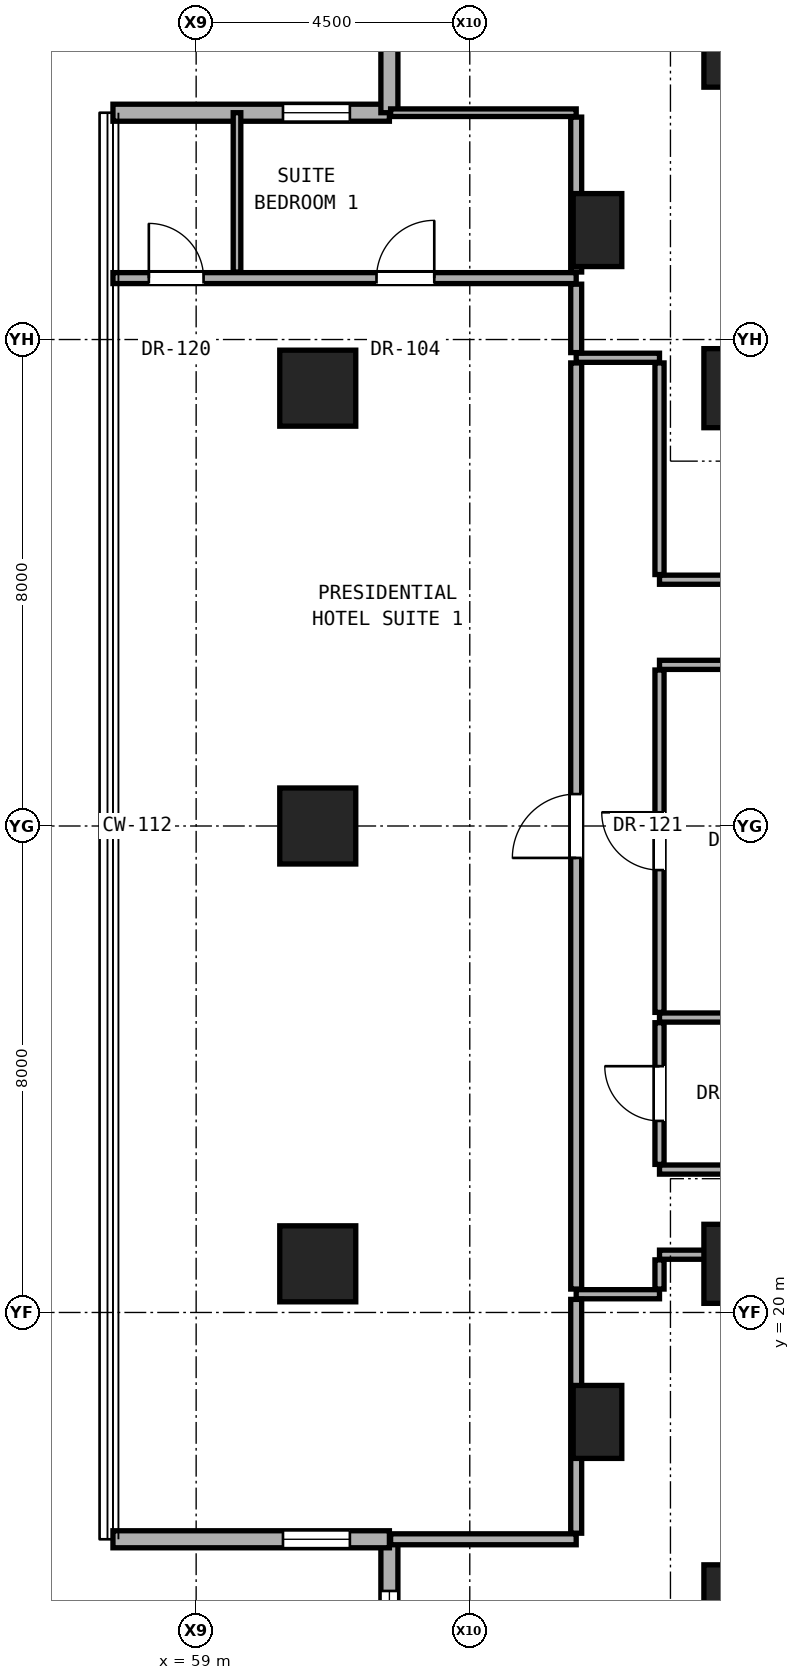
"""IFC4 building model, lengths in metres.
Left out: names, types, materials, properties, quantities, classifications, styles, units other than length and angle.
Written with IfcOpenShell. Run it as: python <this file> out.ifc"""

import sys

from ifc_helpers import new_model, si_unit, direction, frame, frame_2d, origin, origin_2d, place, context, subcontext, project, spatial, rectangle, hollow_rectangle, extrude, element, fill, save


model = new_model("IFC4")
c1 = context("Model", 3, precision=1e-05, world=origin(), true_north=direction((0.0, 1.0)))
c2 = subcontext(c1, "Body", "Model", "MODEL_VIEW")
j1 = project(units=[si_unit("LENGTHUNIT", "METRE"), si_unit("PLANEANGLEUNIT", "RADIAN")], contexts=[c1])
p1 = place(None, origin())
s1 = spatial("IfcSite", under=j1, at=p1, CompositionType="ELEMENT")
p2 = place(p1, origin())
s2 = spatial("IfcBuilding", under=s1, at=p2, CompositionType="ELEMENT")
p3 = place(p2, frame((0.0, 0.0, 71.9)))
s3 = spatial("IfcBuildingStorey", under=s2, at=p3, CompositionType="ELEMENT", Elevation=71.9)
for number, where, z_axis, x_axis in (
    (1, (68.0, 15.2, 0.0), (0.0, 0.0, 1.0), (1.0, 0.0, 0.0)),
    (2, (68.0, 20.8, 0.0), (0.0, 0.0, 1.0), (1.0, 0.0, 0.0)),
    (3, (68.0, 35.2, 0.0), (0.0, 0.0, 1.0), (1.0, 0.0, 0.0)),
    (4, (68.0, 40.8, 0.0), (0.0, 0.0, 1.0), (1.0, 0.0, 0.0)),
):
    element("IfcColumn", number, at=place(p3, frame(where, z_axis=z_axis, x_axis=x_axis)), inside=s3, PredefinedType="COLUMN", context=c2, shape_type="SweptSolid", body=[
        extrude(rectangle(XDim=1.3, YDim=1.3, at=origin_2d()), origin(), (0.0, 0.0, 1.0), 3.3),
    ])
for number, where, z_axis, x_axis in (
    (5, (61.0, 20.8, 0.0), (0.0, 0.0, 1.0), (1.0, 0.0, 0.0)),
    (6, (61.0, 28.0, 0.0), (0.0, 0.0, 1.0), (1.0, 0.0, 0.0)),
    (7, (61.0, 35.2, 0.0), (0.0, 0.0, 1.0), (1.0, 0.0, 0.0)),
):
    element("IfcColumn", number, at=place(p3, frame(where, z_axis=z_axis, x_axis=x_axis)), inside=s3, PredefinedType="COLUMN", context=c2, shape_type="SweptSolid", body=[
        extrude(hollow_rectangle(XDim=1.25, YDim=1.25, WallThickness=0.07, at=origin_2d()), origin(), (0.0, 0.0, 1.0), 3.3),
    ])
for number, where, z_axis, x_axis in (
    (8, (65.6, 18.2, 0.0), (0.0, 0.0, 1.0), (1.0, 0.0, 0.0)),
    (9, (65.6, 37.8, 0.0), (0.0, 0.0, 1.0), (1.0, 0.0, 0.0)),
):
    element("IfcColumn", number, at=place(p3, frame(where, z_axis=z_axis, x_axis=x_axis)), inside=s3, PredefinedType="PILASTER", context=c2, shape_type="SweptSolid", body=[
        extrude(rectangle(XDim=0.8, YDim=1.2, at=origin_2d()), origin(), (0.0, 0.0, 1.0), 3.3),
    ])
p4 = place(p3, frame((62.178, 16.27, 0.0), z_axis=(0.0, 0.0, 1.0), x_axis=(0.0, -1.0, 0.0)))
e10 = element("IfcWall", 10, at=p4, inside=s3, PredefinedType="SOLIDWALL", context=c2, shape_type="SweptSolid", body=[
    extrude(rectangle(XDim=4.546, YDim=0.28, at=frame_2d((2.273, 0.0))), origin(), (0.0, 0.0, 1.0), 3.04),
])
p5 = place(p4, frame((0.85, 0.0, 0.79)))
e11 = element("IfcOpeningElement", 11, at=p5, cuts=e10, PredefinedType="OPENING", context=c2, shape_type="SweptSolid", body=[
    extrude(rectangle(XDim=1.2, YDim=2.1, at=frame_2d((0.6, 1.05))), frame((0.0, 0.15, 0.0), z_axis=(0.0, -1.0, 0.0), x_axis=(1.0, 0.0, 0.0)), (0.0, 0.0, 1.0), 0.3),
])
p6 = place(p3, frame((57.632, 16.27, 0.0), z_axis=(0.0, 0.0, 1.0), x_axis=(1.0, 0.0, 0.0)))
e12 = element("IfcWall", 12, at=p6, inside=s3, PredefinedType="SOLIDWALL", context=c2, shape_type="SweptSolid", body=[
    extrude(rectangle(XDim=4.546, YDim=0.28, at=frame_2d((2.273, 0.0))), origin(), (0.0, 0.0, 1.0), 3.04),
])
p7 = place(p6, frame((2.796, 0.0, 0.85)))
e13 = element("IfcOpeningElement", 13, at=p7, cuts=e12, PredefinedType="OPENING", context=c2, shape_type="SweptSolid", body=[
    extrude(rectangle(XDim=1.1, YDim=2.0, at=frame_2d((0.55, 1.0))), frame((0.0, 0.15, 0.0), z_axis=(0.0, -1.0, 0.0), x_axis=(1.0, 0.0, 0.0)), (0.0, 0.0, 1.0), 0.3),
])
p8 = place(p3, frame((62.178, 39.73, 0.0), z_axis=(0.0, 0.0, 1.0), x_axis=(-1.0, 0.0, 0.0)))
e14 = element("IfcWall", 14, at=p8, inside=s3, PredefinedType="SOLIDWALL", context=c2, shape_type="SweptSolid", body=[
    extrude(rectangle(XDim=4.546, YDim=0.28, at=frame_2d((2.273, 0.0))), origin(), (0.0, 0.0, 1.0), 3.04),
])
p9 = place(p8, frame((0.65, 0.0, 0.85)))
e15 = element("IfcOpeningElement", 15, at=p9, cuts=e14, PredefinedType="OPENING", context=c2, shape_type="SweptSolid", body=[
    extrude(rectangle(XDim=1.1, YDim=2.0, at=frame_2d((0.55, 1.0))), frame((0.0, 0.15, 0.0), z_axis=(0.0, -1.0, 0.0), x_axis=(1.0, 0.0, 0.0)), (0.0, 0.0, 1.0), 0.3),
])
p10 = place(p3, frame((62.178, 44.276, 0.0), z_axis=(0.0, 0.0, 1.0), x_axis=(0.0, -1.0, 0.0)))
e16 = element("IfcWall", 16, at=p10, inside=s3, PredefinedType="SOLIDWALL", context=c2, shape_type="SweptSolid", body=[
    extrude(rectangle(XDim=4.546, YDim=0.28, at=frame_2d((2.273, 0.0))), origin(), (0.0, 0.0, 1.0), 3.04),
])
p11 = place(p3, frame((62.198, 16.27, 0.0), z_axis=(0.0, 0.0, 1.0), x_axis=(1.0, 0.0, 0.0)))
e17 = element("IfcWall", 17, at=p11, inside=s3, PredefinedType="PARTITIONING", context=c2, shape_type="SweptSolid", body=[
    extrude(rectangle(XDim=3.052, YDim=0.18, at=frame_2d((1.526, 0.0))), origin(), (0.0, 0.0, 1.0), 3.06),
])
p12 = place(p3, frame((65.25, 20.3, 0.0), z_axis=(0.0, 0.0, 1.0), x_axis=(1.0, 0.0, 0.0)))
e18 = element("IfcWall", 18, at=p12, inside=s3, PredefinedType="PARTITIONING", context=c2, shape_type="SweptSolid", body=[
    extrude(rectangle(XDim=1.37, YDim=0.15, at=frame_2d((0.685, 0.0))), origin(), (0.0, 0.0, 1.0), 3.06),
])
p13 = place(p3, frame((66.62, 20.95, 0.0), z_axis=(0.0, 0.0, 1.0), x_axis=(1.0, 0.0, 0.0)))
e19 = element("IfcWall", 19, at=p13, inside=s3, PredefinedType="PARTITIONING", context=c2, shape_type="SweptSolid", body=[
    extrude(rectangle(XDim=1.06, YDim=0.15, at=frame_2d((0.53, 0.0))), origin(), (0.0, 0.0, 1.0), 2.452),
])
p14 = place(p3, frame((66.62, 22.35, 0.0), z_axis=(0.0, 0.0, 1.0), x_axis=(1.0, 0.0, 0.0)))
e20 = element("IfcWall", 20, at=p14, inside=s3, PredefinedType="PARTITIONING", context=c2, shape_type="SweptSolid", body=[
    extrude(rectangle(XDim=19.63, YDim=0.15, at=frame_2d((9.815, 0.0))), origin(), (0.0, 0.0, 1.0), 2.125),
])
p15 = place(p14, frame((8.981, 0.0, 0.0)))
e21 = element("IfcOpeningElement", 21, at=p15, cuts=e20, PredefinedType="OPENING", context=c2, shape_type="SweptSolid", body=[
    extrude(rectangle(XDim=0.85, YDim=2.01, at=frame_2d((0.425, 1.005))), frame((0.0, 0.085, 0.0), z_axis=(0.0, -1.0, 0.0), x_axis=(1.0, 0.0, 0.0)), (0.0, 0.0, 1.0), 0.17),
])
p16 = place(p14, frame((16.061, 0.0, 0.0)))
e22 = element("IfcOpeningElement", 22, at=p16, cuts=e20, PredefinedType="OPENING", context=c2, shape_type="SweptSolid", body=[
    extrude(rectangle(XDim=0.85, YDim=2.01, at=frame_2d((0.425, 1.005))), frame((0.0, 0.085, 0.0), z_axis=(0.0, -1.0, 0.0), x_axis=(1.0, 0.0, 0.0)), (0.0, 0.0, 1.0), 0.17),
])
p17 = place(p3, frame((66.62, 24.85, 0.0), z_axis=(0.0, 0.0, 1.0), x_axis=(1.0, 0.0, 0.0)))
e23 = element("IfcWall", 23, at=p17, inside=s3, PredefinedType="PARTITIONING", context=c2, shape_type="SweptSolid", body=[
    extrude(rectangle(XDim=3.13, YDim=0.15, at=frame_2d((1.565, 0.0))), origin(), (0.0, 0.0, 1.0), 2.125),
])
p18 = place(p3, frame((66.62, 30.65, 0.0), z_axis=(0.0, 0.0, 1.0), x_axis=(1.0, 0.0, 0.0)))
e24 = element("IfcWall", 24, at=p18, inside=s3, PredefinedType="PARTITIONING", context=c2, shape_type="SweptSolid", body=[
    extrude(rectangle(XDim=19.63, YDim=0.15, at=frame_2d((9.815, 0.0))), origin(), (0.0, 0.0, 1.0), 2.125),
])
p19 = place(p18, frame((3.855, 0.0, 0.0)))
e25 = element("IfcOpeningElement", 25, at=p19, cuts=e24, PredefinedType="OPENING", context=c2, shape_type="SweptSolid", body=[
    extrude(rectangle(XDim=0.85, YDim=2.01, at=frame_2d((0.425, 1.005))), frame((0.0, 0.085, 0.0), z_axis=(0.0, -1.0, 0.0), x_axis=(1.0, 0.0, 0.0)), (0.0, 0.0, 1.0), 0.17),
])
p20 = place(p18, frame((8.981, 0.0, 0.0)))
e26 = element("IfcOpeningElement", 26, at=p20, cuts=e24, PredefinedType="OPENING", context=c2, shape_type="SweptSolid", body=[
    extrude(rectangle(XDim=0.85, YDim=2.01, at=frame_2d((0.425, 1.005))), frame((0.0, 0.085, 0.0), z_axis=(0.0, -1.0, 0.0), x_axis=(1.0, 0.0, 0.0)), (0.0, 0.0, 1.0), 0.17),
])
p21 = place(p18, frame((16.061, 0.0, 0.0)))
e27 = element("IfcOpeningElement", 27, at=p21, cuts=e24, PredefinedType="OPENING", context=c2, shape_type="SweptSolid", body=[
    extrude(rectangle(XDim=0.85, YDim=2.01, at=frame_2d((0.425, 1.005))), frame((0.0, 0.085, 0.0), z_axis=(0.0, -1.0, 0.0), x_axis=(1.0, 0.0, 0.0)), (0.0, 0.0, 1.0), 0.17),
])
p22 = place(p3, frame((66.62, 32.05, 0.0), z_axis=(0.0, 0.0, 1.0), x_axis=(1.0, 0.0, 0.0)))
e28 = element("IfcWall", 28, at=p22, inside=s3, PredefinedType="PARTITIONING", context=c2, shape_type="SweptSolid", body=[
    extrude(rectangle(XDim=2.18, YDim=0.15, at=frame_2d((1.09, 0.0))), origin(), (0.0, 0.0, 1.0), 2.125),
])
p23 = place(p3, frame((65.25, 35.7, 0.0), z_axis=(0.0, 0.0, 1.0), x_axis=(1.0, 0.0, 0.0)))
e29 = element("IfcWall", 29, at=p23, inside=s3, PredefinedType="PARTITIONING", context=c2, shape_type="SweptSolid", body=[
    extrude(rectangle(XDim=1.37, YDim=0.15, at=frame_2d((0.685, 0.0))), origin(), (0.0, 0.0, 1.0), 3.06),
])
p24 = place(p3, frame((57.632, 37.01, 0.0), z_axis=(0.0, 0.0, 1.0), x_axis=(1.0, 0.0, 0.0)))
e30 = element("IfcWall", 30, at=p24, inside=s3, PredefinedType="PARTITIONING", context=c2, shape_type="SweptSolid", body=[
    extrude(rectangle(XDim=7.618, YDim=0.18, at=frame_2d((3.809, 0.0))), origin(), (0.0, 0.0, 1.0), 2.436),
])
p25 = place(p24, frame((4.334, 0.0, 0.0)))
e31 = element("IfcOpeningElement", 31, at=p25, cuts=e30, PredefinedType="OPENING", context=c2, shape_type="SweptSolid", body=[
    extrude(rectangle(XDim=0.95, YDim=2.15, at=frame_2d((0.475, 1.075))), frame((0.0, 0.1, 0.0), z_axis=(0.0, -1.0, 0.0), x_axis=(1.0, 0.0, 0.0)), (0.0, 0.0, 1.0), 0.2),
])
p26 = place(p24, frame((0.59, 0.0, 0.0)))
e32 = element("IfcOpeningElement", 32, at=p26, cuts=e30, PredefinedType="OPENING", context=c2, shape_type="SweptSolid", body=[
    extrude(rectangle(XDim=0.9, YDim=2.1, at=frame_2d((0.45, 1.05))), frame((0.0, 0.1, 0.0), z_axis=(0.0, -1.0, 0.0), x_axis=(1.0, 0.0, 0.0)), (0.0, 0.0, 1.0), 0.2),
])
p27 = place(p3, frame((62.198, 39.73, 0.0), z_axis=(0.0, 0.0, 1.0), x_axis=(1.0, 0.0, 0.0)))
e33 = element("IfcWall", 33, at=p27, inside=s3, PredefinedType="PARTITIONING", context=c2, shape_type="SweptSolid", body=[
    extrude(rectangle(XDim=3.052, YDim=0.125, at=frame_2d((1.526, 0.0))), origin(), (0.0, 0.0, 1.0), 3.06),
])
p28 = place(p3, frame((59.672, 37.11, 0.0), z_axis=(0.0, 0.0, 1.0), x_axis=(0.0, 1.0, 0.0)))
e34 = element("IfcWall", 34, at=p28, inside=s3, PredefinedType="PARTITIONING", context=c2, shape_type="SweptSolid", body=[
    extrude(rectangle(XDim=2.62, YDim=0.125, at=frame_2d((1.31, 0.0))), origin(), (0.0, 0.0, 1.0), 3.06),
])
p29 = place(p3, frame((65.25, 16.37, 0.0), z_axis=(0.0, 0.0, 1.0), x_axis=(0.0, 1.0, 0.0)))
e35 = element("IfcWall", 35, at=p29, inside=s3, PredefinedType="PARTITIONING", context=c2, shape_type="SweptSolid", body=[
    extrude(rectangle(XDim=3.845, YDim=0.18, at=frame_2d((1.922, 0.0))), origin(), (0.0, 0.0, 1.0), 2.436),
])
p30 = place(p3, frame((65.25, 20.385, 0.0), z_axis=(0.0, 0.0, 1.0), x_axis=(0.0, 1.0, 0.0)))
e36 = element("IfcWall", 36, at=p30, inside=s3, PredefinedType="PARTITIONING", context=c2, shape_type="SweptSolid", body=[
    extrude(rectangle(XDim=15.23, YDim=0.18, at=frame_2d((7.615, 0.0))), origin(), (0.0, 0.0, 1.0), 2.279),
])
p31 = place(p30, frame((7.09, 0.0, 0.0)))
e37 = element("IfcOpeningElement", 37, at=p31, cuts=e36, PredefinedType="OPENING", context=c2, shape_type="SweptSolid", body=[
    extrude(rectangle(XDim=1.05, YDim=2.2, at=frame_2d((0.525, 1.1))), frame((0.0, 0.1, 0.0), z_axis=(0.0, -1.0, 0.0), x_axis=(1.0, 0.0, 0.0)), (0.0, 0.0, 1.0), 0.2),
])
p32 = place(p3, frame((65.25, 35.785, 0.0), z_axis=(0.0, 0.0, 1.0), x_axis=(0.0, 1.0, 0.0)))
e38 = element("IfcWall", 38, at=p32, inside=s3, PredefinedType="PARTITIONING", context=c2, shape_type="SweptSolid", body=[
    extrude(rectangle(XDim=1.125, YDim=0.18, at=frame_2d((0.562, 0.0))), origin(), (0.0, 0.0, 1.0), 3.06),
])
p33 = place(p3, frame((65.25, 37.11, 0.0), z_axis=(0.0, 0.0, 1.0), x_axis=(0.0, 1.0, 0.0)))
e39 = element("IfcWall", 39, at=p33, inside=s3, PredefinedType="PARTITIONING", context=c2, shape_type="SweptSolid", body=[
    extrude(rectangle(XDim=2.547, YDim=0.18, at=frame_2d((1.274, 0.0))), origin(), (0.0, 0.0, 1.0), 2.436),
])
p34 = place(p3, frame((66.62, 20.385, 0.0), z_axis=(0.0, 0.0, 1.0), x_axis=(0.0, 1.0, 0.0)))
e40 = element("IfcWall", 40, at=p34, inside=s3, PredefinedType="PARTITIONING", context=c2, shape_type="SweptSolid", body=[
    extrude(rectangle(XDim=0.48, YDim=0.15, at=frame_2d((0.24, 0.0))), origin(), (0.0, 0.0, 1.0), 2.452),
])
p35 = place(p3, frame((66.62, 22.435, 0.0), z_axis=(0.0, 0.0, 1.0), x_axis=(0.0, 1.0, 0.0)))
e41 = element("IfcWall", 41, at=p35, inside=s3, PredefinedType="PARTITIONING", context=c2, shape_type="SweptSolid", body=[
    extrude(rectangle(XDim=2.33, YDim=0.15, at=frame_2d((1.165, 0.0))), origin(), (0.0, 0.0, 1.0), 3.06),
])
p36 = place(p35, frame((0.715, 0.0, 0.0)))
e42 = element("IfcOpeningElement", 42, at=p36, cuts=e41, PredefinedType="OPENING", context=c2, shape_type="SweptSolid", body=[
    extrude(rectangle(XDim=0.9, YDim=2.1, at=frame_2d((0.45, 1.05))), frame((0.0, 0.085, 0.0), z_axis=(0.0, -1.0, 0.0), x_axis=(1.0, 0.0, 0.0)), (0.0, 0.0, 1.0), 0.17),
])
p37 = place(p3, frame((66.62, 24.935, 0.0), z_axis=(0.0, 0.0, 1.0), x_axis=(0.0, 1.0, 0.0)))
e43 = element("IfcWall", 43, at=p37, inside=s3, PredefinedType="PARTITIONING", context=c2, shape_type="SweptSolid", body=[
    extrude(rectangle(XDim=5.63, YDim=0.15, at=frame_2d((2.815, 0.0))), origin(), (0.0, 0.0, 1.0), 2.279),
])
p38 = place(p37, frame((2.34, 0.0, 0.0)))
e44 = element("IfcOpeningElement", 44, at=p38, cuts=e43, PredefinedType="OPENING", context=c2, shape_type="SweptSolid", body=[
    extrude(rectangle(XDim=0.95, YDim=2.15, at=frame_2d((0.475, 1.075))), frame((0.0, 0.085, 0.0), z_axis=(0.0, -1.0, 0.0), x_axis=(1.0, 0.0, 0.0)), (0.0, 0.0, 1.0), 0.17),
])
p39 = place(p3, frame((66.62, 32.135, 0.0), z_axis=(0.0, 0.0, 1.0), x_axis=(0.0, 1.0, 0.0)))
e45 = element("IfcWall", 45, at=p39, inside=s3, PredefinedType="PARTITIONING", context=c2, shape_type="SweptSolid", body=[
    extrude(rectangle(XDim=3.48, YDim=0.15, at=frame_2d((1.74, 0.0))), origin(), (0.0, 0.0, 1.0), 2.452),
])
p40 = place(p5, origin())
e46 = element("IfcWindow", 46, at=p40, inside=s3, PartitioningType="SINGLE_PANEL", PredefinedType="WINDOW", context=c2, shape_type="SweptSolid", body=[
    extrude(rectangle(XDim=1.2, YDim=2.1, at=frame_2d((0.6, 1.05))), frame((0.0, 0.03, 0.0), z_axis=(0.0, -1.0, 0.0), x_axis=(1.0, 0.0, 0.0)), (0.0, 0.0, 1.0), 0.06),
])
fill(e11, e46)
p41 = place(p7, origin())
e47 = element("IfcWindow", 47, at=p41, inside=s3, PartitioningType="SINGLE_PANEL", PredefinedType="WINDOW", context=c2, shape_type="SweptSolid", body=[
    extrude(rectangle(XDim=1.1, YDim=2.0, at=frame_2d((0.55, 1.0))), frame((0.0, 0.03, 0.0), z_axis=(0.0, -1.0, 0.0), x_axis=(1.0, 0.0, 0.0)), (0.0, 0.0, 1.0), 0.06),
])
fill(e13, e47)
p42 = place(p9, origin())
e48 = element("IfcWindow", 48, at=p42, inside=s3, PartitioningType="SINGLE_PANEL", PredefinedType="WINDOW", context=c2, shape_type="SweptSolid", body=[
    extrude(rectangle(XDim=1.1, YDim=2.0, at=frame_2d((0.55, 1.0))), frame((0.0, 0.03, 0.0), z_axis=(0.0, -1.0, 0.0), x_axis=(1.0, 0.0, 0.0)), (0.0, 0.0, 1.0), 0.06),
])
fill(e15, e48)
p43 = place(p36, origin())
e49 = element("IfcDoor", 49, at=p43, inside=s3, OperationType="SINGLE_SWING_RIGHT", PredefinedType="DOOR", context=c2, shape_type="SweptSolid", body=[
    extrude(rectangle(XDim=0.9, YDim=2.1, at=frame_2d((0.45, 1.05))), frame((0.0, 0.025, 0.0), z_axis=(0.0, -1.0, 0.0), x_axis=(1.0, 0.0, 0.0)), (0.0, 0.0, 1.0), 0.05),
])
fill(e42, e49)
p44 = place(p31, origin())
e50 = element("IfcDoor", 50, at=p44, inside=s3, OperationType="SINGLE_SWING_LEFT", PredefinedType="DOOR", context=c2, shape_type="SweptSolid", body=[
    extrude(rectangle(XDim=1.05, YDim=2.2, at=frame_2d((0.525, 1.1))), frame((0.0, 0.025, 0.0), z_axis=(0.0, -1.0, 0.0), x_axis=(1.0, 0.0, 0.0)), (0.0, 0.0, 1.0), 0.05),
])
fill(e37, e50)
p45 = place(p25, origin())
e51 = element("IfcDoor", 51, at=p45, inside=s3, OperationType="SINGLE_SWING_RIGHT", PredefinedType="DOOR", context=c2, shape_type="SweptSolid", body=[
    extrude(rectangle(XDim=0.95, YDim=2.15, at=frame_2d((0.475, 1.075))), frame((0.0, 0.025, 0.0), z_axis=(0.0, -1.0, 0.0), x_axis=(1.0, 0.0, 0.0)), (0.0, 0.0, 1.0), 0.05),
])
fill(e31, e51)
p46 = place(p26, origin())
e52 = element("IfcDoor", 52, at=p46, inside=s3, OperationType="SINGLE_SWING_LEFT", PredefinedType="DOOR", context=c2, shape_type="SweptSolid", body=[
    extrude(rectangle(XDim=0.9, YDim=2.1, at=frame_2d((0.45, 1.05))), frame((0.0, 0.025, 0.0), z_axis=(0.0, -1.0, 0.0), x_axis=(1.0, 0.0, 0.0)), (0.0, 0.0, 1.0), 0.05),
])
fill(e32, e52)
p47 = place(p38, origin())
e53 = element("IfcDoor", 53, at=p47, inside=s3, OperationType="SINGLE_SWING_RIGHT", PredefinedType="DOOR", context=c2, shape_type="SweptSolid", body=[
    extrude(rectangle(XDim=0.95, YDim=2.15, at=frame_2d((0.475, 1.075))), frame((0.0, 0.025, 0.0), z_axis=(0.0, -1.0, 0.0), x_axis=(1.0, 0.0, 0.0)), (0.0, 0.0, 1.0), 0.05),
])
fill(e44, e53)
save(model, sys.argv[1])
